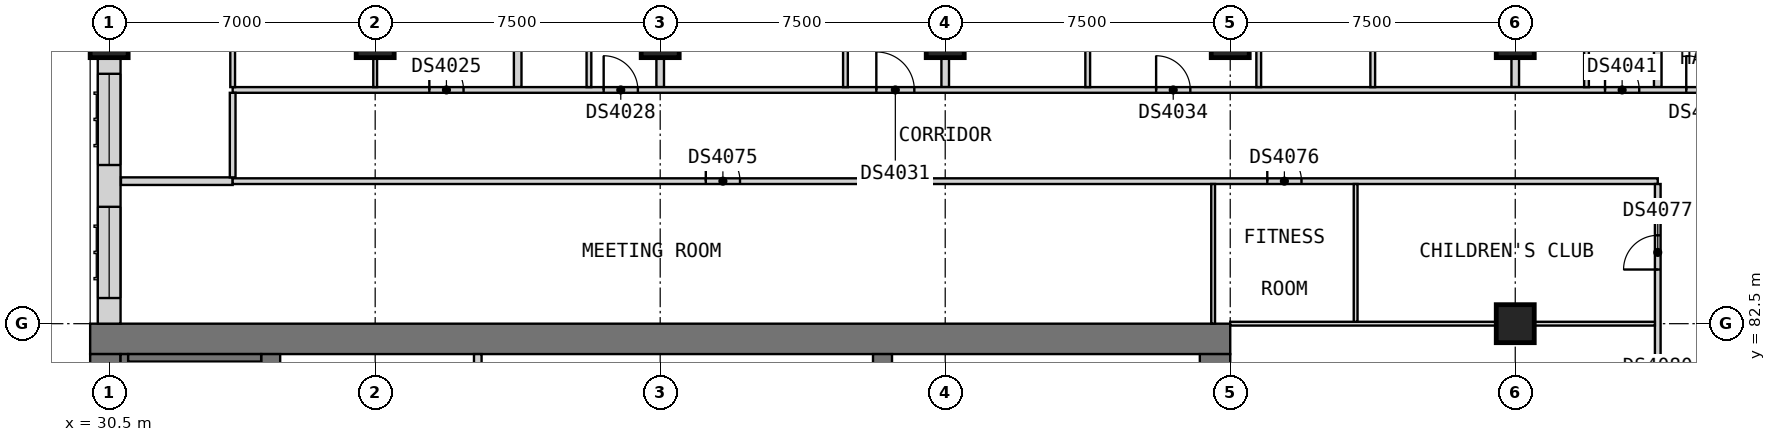
"""IFC4 building model, lengths in metres.
Left out: names, types, materials, properties, quantities, classifications, styles, units other than length and angle.
Written with IfcOpenShell. Run it as: python <this file> out.ifc"""

import sys

from ifc_helpers import new_model, si_unit, direction, frame, frame_2d, origin, origin_2d, place, context, subcontext, project, spatial, rectangle, extrude, element, fill, save


model = new_model("IFC4")
c1 = context("Model", 3, precision=1e-05, world=origin(), true_north=direction((0.0, 1.0)))
c2 = subcontext(c1, "Body", "Model", "MODEL_VIEW")
j1 = project(units=[si_unit("LENGTHUNIT", "METRE"), si_unit("PLANEANGLEUNIT", "RADIAN")], contexts=[c1])
p1 = place(None, origin())
s1 = spatial("IfcSite", under=j1, at=p1, CompositionType="ELEMENT")
p2 = place(p1, origin())
s2 = spatial("IfcBuilding", under=s1, at=p2, CompositionType="ELEMENT")
p3 = place(p2, frame((0.0, 0.0, 141.0)))
s3 = spatial("IfcBuildingStorey", under=s2, at=p3, CompositionType="ELEMENT", Elevation=141.0)
for number, where, z_axis, x_axis in (
    (1, (30.5, 90.0, 0.0), (0.0, 0.0, 1.0), (1.0, 0.0, 0.0)),
    (2, (37.5, 90.0, 0.0), (0.0, 0.0, 1.0), (1.0, 0.0, 0.0)),
    (3, (45.0, 90.0, 0.0), (0.0, 0.0, 1.0), (1.0, 0.0, 0.0)),
    (4, (52.5, 90.0, 0.0), (0.0, 0.0, 1.0), (1.0, 0.0, 0.0)),
    (5, (60.0, 90.0, 0.0), (0.0, 0.0, 1.0), (1.0, 0.0, 0.0)),
    (6, (67.5, 82.5, 0.0), (0.0, 0.0, 1.0), (1.0, 0.0, 0.0)),
    (7, (67.5, 90.0, 0.0), (0.0, 0.0, 1.0), (1.0, 0.0, 0.0)),
):
    element("IfcColumn", number, at=place(p3, frame(where, z_axis=z_axis, x_axis=x_axis)), inside=s3, PredefinedType="COLUMN", context=c2, shape_type="SweptSolid", body=[
        extrude(rectangle(XDim=1.0, YDim=1.0, at=origin_2d()), origin(), (0.0, 0.0, 1.0), 3.6),
    ])
p4 = place(p3, frame((30.0, 82.1, 0.0), z_axis=(0.0, 0.0, 1.0), x_axis=(1.0, 0.0, 0.0)))
e8 = element("IfcWall", 8, at=p4, inside=s3, PredefinedType="SHEAR", context=c2, shape_type="SweptSolid", body=[
    extrude(rectangle(XDim=30.0, YDim=0.8, at=frame_2d((15.0, 0.0))), origin(), (0.0, 0.0, 1.0), 3.6),
])
p5 = place(p3, frame((30.4, 60.8, 0.0), z_axis=(0.0, 0.0, 1.0), x_axis=(0.0, 1.0, 0.0)))
e9 = element("IfcWall", 9, at=p5, inside=s3, PredefinedType="SHEAR", context=c2, shape_type="SweptSolid", body=[
    extrude(rectangle(XDim=20.9, YDim=0.8, at=frame_2d((10.45, 0.0))), origin(), (0.0, 0.0, 1.0), 3.6),
])
p6 = place(p3, frame((59.6, 60.8, 0.0), z_axis=(0.0, 0.0, 1.0), x_axis=(0.0, 1.0, 0.0)))
e10 = element("IfcWall", 10, at=p6, inside=s3, PredefinedType="SHEAR", context=c2, shape_type="SweptSolid", body=[
    extrude(rectangle(XDim=20.9, YDim=0.8, at=frame_2d((10.45, 0.0))), origin(), (0.0, 0.0, 1.0), 3.6),
])
p7 = place(p6, frame((14.7, 0.0, 0.0)))
e11 = element("IfcOpeningElement", 11, at=p7, cuts=e10, PredefinedType="OPENING", context=c2, shape_type="SweptSolid", body=[
    extrude(rectangle(XDim=1.8, YDim=2.1, at=frame_2d((0.9, 1.05))), frame((0.0, 0.41, 0.0), z_axis=(0.0, -1.0, 0.0), x_axis=(1.0, 0.0, 0.0)), (0.0, 0.0, 1.0), 0.82),
])
for number, where, z_axis, x_axis in (
    (12, (34.75, 78.3, 0.0), (0.0, 0.0, 1.0), (0.0, 1.0, 0.0)),
    (13, (50.85, 78.3, 0.0), (0.0, 0.0, 1.0), (0.0, 1.0, 0.0)),
):
    element("IfcWall", number, at=place(p3, frame(where, z_axis=z_axis, x_axis=x_axis)), inside=s3, PredefinedType="SHEAR", context=c2, shape_type="SweptSolid", body=[
        extrude(rectangle(XDim=3.4, YDim=0.5, at=frame_2d((1.7, 0.0))), origin(), (0.0, 0.0, 1.0), 3.6),
    ])
p8 = place(p3, frame((30.5, 89.5, 0.0), z_axis=(0.0, 0.0, 1.0), x_axis=(0.0, -1.0, 0.0)))
e14 = element("IfcWall", 14, at=p8, inside=s3, PredefinedType="SOLIDWALL", context=c2, shape_type="SweptSolid", body=[
    extrude(rectangle(XDim=7.0, YDim=0.6, at=frame_2d((3.5, 0.0))), origin(), (0.0, 0.0, 1.0), 3.35),
])
p9 = place(p8, frame((3.925, 0.0, 0.8)))
e15 = element("IfcOpeningElement", 15, at=p9, cuts=e14, PredefinedType="OPENING", context=c2, shape_type="SweptSolid", body=[
    extrude(rectangle(XDim=2.4, YDim=1.8, at=frame_2d((1.2, 0.9))), frame((0.0, 0.31, 0.0), z_axis=(0.0, -1.0, 0.0), x_axis=(1.0, 0.0, 0.0)), (0.0, 0.0, 1.0), 0.62),
])
p10 = place(p8, frame((0.425, 0.0, 0.8)))
e16 = element("IfcOpeningElement", 16, at=p10, cuts=e14, PredefinedType="OPENING", context=c2, shape_type="SweptSolid", body=[
    extrude(rectangle(XDim=2.4, YDim=1.8, at=frame_2d((1.2, 0.9))), frame((0.0, 0.31, 0.0), z_axis=(0.0, -1.0, 0.0), x_axis=(1.0, 0.0, 0.0)), (0.0, 0.0, 1.0), 0.62),
])
p11 = place(p3, frame((40.2, 78.5, 0.0), z_axis=(0.0, 0.0, 1.0), x_axis=(0.0, 1.0, 0.0)))
e17 = element("IfcWall", 17, at=p11, inside=s3, PredefinedType="SOLIDWALL", context=c2, shape_type="SweptSolid", body=[
    extrude(rectangle(XDim=3.2, YDim=0.2, at=frame_2d((1.6, 0.0))), origin(), (0.0, 0.0, 1.0), 3.6),
])
p12 = place(p3, frame((30.9, 60.8, 0.0), z_axis=(0.0, 0.0, 1.0), x_axis=(0.0, 1.0, 0.0)))
e18 = element("IfcWall", 18, at=p12, inside=s3, PredefinedType="SOLIDWALL", context=c2, shape_type="SweptSolid", body=[
    extrude(rectangle(XDim=20.9, YDim=0.2, at=frame_2d((10.45, 0.0))), origin(), (0.0, 0.0, 1.0), 3.35),
])
p13 = place(p3, frame((31.0, 81.6, 0.0), z_axis=(0.0, 0.0, 1.0), x_axis=(1.0, 0.0, 0.0)))
e19 = element("IfcWall", 19, at=p13, inside=s3, PredefinedType="SOLIDWALL", context=c2, shape_type="SweptSolid", body=[
    extrude(rectangle(XDim=3.5, YDim=0.2, at=frame_2d((1.75, 0.0))), origin(), (0.0, 0.0, 1.0), 3.35),
])
p14 = place(p3, frame((30.81, 86.25, 0.0), z_axis=(0.0, 0.0, 1.0), x_axis=(1.0, 0.0, 0.0)))
e20 = element("IfcWall", 20, at=p14, inside=s3, PredefinedType="PARTITIONING", context=c2, shape_type="SweptSolid", body=[
    extrude(rectangle(XDim=2.94, YDim=0.2, at=frame_2d((1.47, 0.0))), origin(), (0.0, 0.0, 1.0), 3.35),
])
p15 = place(p3, frame((41.25, 88.725, 0.0), z_axis=(0.0, 0.0, 1.0), x_axis=(0.0, 1.0, 0.0)))
e21 = element("IfcWall", 21, at=p15, inside=s3, PredefinedType="PARTITIONING", context=c2, shape_type="SweptSolid", body=[
    extrude(rectangle(XDim=11.715, YDim=0.2, at=frame_2d((5.857, 0.0))), origin(), (0.0, 0.0, 1.0), 3.35),
])
for number, where, z_axis, x_axis in (
    (22, (45.0, 88.725, 0.0), (0.0, 0.0, 1.0), (0.0, 1.0, 0.0)),
    (23, (52.5, 88.725, 0.0), (0.0, 0.0, 1.0), (0.0, 1.0, 0.0)),
    (24, (67.5, 88.725, 0.0), (0.0, 0.0, 1.0), (0.0, 1.0, 0.0)),
):
    element("IfcWall", number, at=place(p3, frame(where, z_axis=z_axis, x_axis=x_axis)), inside=s3, PredefinedType="PARTITIONING", context=c2, shape_type="SweptSolid", body=[
        extrude(rectangle(XDim=12.525, YDim=0.2, at=frame_2d((6.262, 0.0))), origin(), (0.0, 0.0, 1.0), 3.35),
    ])
p16 = place(p3, frame((71.25, 88.725, 0.0), z_axis=(0.0, 0.0, 1.0), x_axis=(0.0, 1.0, 0.0)))
e25 = element("IfcWall", 25, at=p16, inside=s3, PredefinedType="PARTITIONING", context=c2, shape_type="SweptSolid", body=[
    extrude(rectangle(XDim=11.715, YDim=0.2, at=frame_2d((5.857, 0.0))), origin(), (0.0, 0.0, 1.0), 3.35),
])
p17 = place(p3, frame((33.75, 86.25, 0.0), z_axis=(0.0, 0.0, 1.0), x_axis=(1.0, 0.0, 0.0)))
e26 = element("IfcWall", 26, at=p17, inside=s3, PredefinedType="PARTITIONING", context=c2, shape_type="SweptSolid", body=[
    extrude(rectangle(XDim=37.5, YDim=0.15, at=frame_2d((18.75, 0.0))), origin(), (0.0, 0.0, 1.0), 3.35),
])
p18 = place(p17, frame((12.45, 0.0, 0.0)))
e27 = element("IfcOpeningElement", 27, at=p18, cuts=e26, PredefinedType="OPENING", context=c2, shape_type="SweptSolid", body=[
    extrude(rectangle(XDim=0.9, YDim=2.1, at=frame_2d((0.45, 1.05))), frame((0.0, 0.085, 0.0), z_axis=(0.0, -1.0, 0.0), x_axis=(1.0, 0.0, 0.0)), (0.0, 0.0, 1.0), 0.17),
])
p19 = place(p17, frame((27.225, 0.0, 0.0)))
e28 = element("IfcOpeningElement", 28, at=p19, cuts=e26, PredefinedType="OPENING", context=c2, shape_type="SweptSolid", body=[
    extrude(rectangle(XDim=0.9, YDim=2.1, at=frame_2d((0.45, 1.05))), frame((0.0, 0.085, 0.0), z_axis=(0.0, -1.0, 0.0), x_axis=(1.0, 0.0, 0.0)), (0.0, 0.0, 1.0), 0.17),
])
p20 = place(p3, frame((33.75, 88.65, 0.0), z_axis=(0.0, 0.0, 1.0), x_axis=(1.0, 0.0, 0.0)))
e29 = element("IfcWall", 29, at=p20, inside=s3, PredefinedType="PARTITIONING", context=c2, shape_type="SweptSolid", body=[
    extrude(rectangle(XDim=39.9, YDim=0.15, at=frame_2d((19.95, 0.0))), origin(), (0.0, 0.0, 1.0), 3.35),
])
p21 = place(p20, frame((5.175, 0.0, 0.0)))
e30 = element("IfcOpeningElement", 30, at=p21, cuts=e29, PredefinedType="OPENING", context=c2, shape_type="SweptSolid", body=[
    extrude(rectangle(XDim=0.9, YDim=2.1, at=frame_2d((0.45, 1.05))), frame((0.0, 0.085, 0.0), z_axis=(0.0, -1.0, 0.0), x_axis=(1.0, 0.0, 0.0)), (0.0, 0.0, 1.0), 0.17),
])
p22 = place(p20, frame((9.762, 0.0, 0.0)))
e31 = element("IfcOpeningElement", 31, at=p22, cuts=e29, PredefinedType="OPENING", context=c2, shape_type="SweptSolid", body=[
    extrude(rectangle(XDim=0.9, YDim=2.1, at=frame_2d((0.45, 1.05))), frame((0.0, 0.085, 0.0), z_axis=(0.0, -1.0, 0.0), x_axis=(1.0, 0.0, 0.0)), (0.0, 0.0, 1.0), 0.17),
])
p23 = place(p20, frame((16.938, 0.0, 0.0)))
e32 = element("IfcOpeningElement", 32, at=p23, cuts=e29, PredefinedType="OPENING", context=c2, shape_type="SweptSolid", body=[
    extrude(rectangle(XDim=1.0, YDim=2.1, at=frame_2d((0.5, 1.05))), frame((0.0, 0.085, 0.0), z_axis=(0.0, -1.0, 0.0), x_axis=(1.0, 0.0, 0.0)), (0.0, 0.0, 1.0), 0.17),
])
p24 = place(p20, frame((24.3, 0.0, 0.0)))
e33 = element("IfcOpeningElement", 33, at=p24, cuts=e29, PredefinedType="OPENING", context=c2, shape_type="SweptSolid", body=[
    extrude(rectangle(XDim=0.9, YDim=2.1, at=frame_2d((0.45, 1.05))), frame((0.0, 0.085, 0.0), z_axis=(0.0, -1.0, 0.0), x_axis=(1.0, 0.0, 0.0)), (0.0, 0.0, 1.0), 0.17),
])
p25 = place(p20, frame((36.113, 0.0, 0.0)))
e34 = element("IfcOpeningElement", 34, at=p25, cuts=e29, PredefinedType="OPENING", context=c2, shape_type="SweptSolid", body=[
    extrude(rectangle(XDim=0.9, YDim=2.1, at=frame_2d((0.45, 1.05))), frame((0.0, 0.085, 0.0), z_axis=(0.0, -1.0, 0.0), x_axis=(1.0, 0.0, 0.0)), (0.0, 0.0, 1.0), 0.17),
])
p26 = place(p20, frame((38.25, 0.0, 0.0)))
e35 = element("IfcOpeningElement", 35, at=p26, cuts=e29, PredefinedType="OPENING", context=c2, shape_type="SweptSolid", body=[
    extrude(rectangle(XDim=0.9, YDim=2.1, at=frame_2d((0.45, 1.05))), frame((0.0, 0.085, 0.0), z_axis=(0.0, -1.0, 0.0), x_axis=(1.0, 0.0, 0.0)), (0.0, 0.0, 1.0), 0.17),
])
p27 = place(p3, frame((33.75, 86.35, 0.0), z_axis=(0.0, 0.0, 1.0), x_axis=(0.0, 1.0, 0.0)))
e36 = element("IfcWall", 36, at=p27, inside=s3, PredefinedType="PARTITIONING", context=c2, shape_type="SweptSolid", body=[
    extrude(rectangle(XDim=2.225, YDim=0.15, at=frame_2d((1.112, 0.0))), origin(), (0.0, 0.0, 1.0), 3.35),
])
p28 = place(p3, frame((71.25, 78.075, 0.0), z_axis=(0.0, 0.0, 1.0), x_axis=(0.0, 1.0, 0.0)))
e37 = element("IfcWall", 37, at=p28, inside=s3, PredefinedType="PARTITIONING", context=c2, shape_type="SweptSolid", body=[
    extrude(rectangle(XDim=8.1, YDim=0.15, at=frame_2d((4.05, 0.0))), origin(), (0.0, 0.0, 1.0), 3.35),
])
p29 = place(p28, frame((5.85, 0.0, 0.0)))
e38 = element("IfcOpeningElement", 38, at=p29, cuts=e37, PredefinedType="OPENING", context=c2, shape_type="SweptSolid", body=[
    extrude(rectangle(XDim=0.9, YDim=2.1, at=frame_2d((0.45, 1.05))), frame((0.0, 0.085, 0.0), z_axis=(0.0, -1.0, 0.0), x_axis=(1.0, 0.0, 0.0)), (0.0, 0.0, 1.0), 0.17),
])
p30 = place(p28, frame((1.725, 0.0, 0.0)))
e39 = element("IfcOpeningElement", 39, at=p30, cuts=e37, PredefinedType="OPENING", context=c2, shape_type="SweptSolid", body=[
    extrude(rectangle(XDim=0.9, YDim=2.1, at=frame_2d((0.45, 1.05))), frame((0.0, 0.085, 0.0), z_axis=(0.0, -1.0, 0.0), x_axis=(1.0, 0.0, 0.0)), (0.0, 0.0, 1.0), 0.17),
])
p31 = place(p3, frame((60.0, 82.5, 0.0), z_axis=(0.0, 0.0, 1.0), x_axis=(1.0, 0.0, 0.0)))
e40 = element("IfcWall", 40, at=p31, inside=s3, PredefinedType="PARTITIONING", context=c2, shape_type="SweptSolid", body=[
    extrude(rectangle(XDim=11.175, YDim=0.1, at=frame_2d((5.587, 0.0))), origin(), (0.0, 0.0, 1.0), 3.35),
])
p32 = place(p3, frame((37.5, 88.725, 0.0), z_axis=(0.0, 0.0, 1.0), x_axis=(0.0, 1.0, 0.0)))
e41 = element("IfcWall", 41, at=p32, inside=s3, PredefinedType="PARTITIONING", context=c2, shape_type="SweptSolid", body=[
    extrude(rectangle(XDim=4.475, YDim=0.1, at=frame_2d((2.237, 0.0))), origin(), (0.0, 0.0, 1.0), 3.35),
])
p33 = place(p32, frame((1.825, 0.0, 0.0)))
e42 = element("IfcOpeningElement", 42, at=p33, cuts=e41, PredefinedType="OPENING", context=c2, shape_type="SweptSolid", body=[
    extrude(rectangle(XDim=0.9, YDim=2.1, at=frame_2d((0.45, 1.05))), frame((0.0, 0.06, 0.0), z_axis=(0.0, -1.0, 0.0), x_axis=(1.0, 0.0, 0.0)), (0.0, 0.0, 1.0), 0.12),
])
p34 = place(p3, frame((59.55, 82.5, 0.0), z_axis=(0.0, 0.0, 1.0), x_axis=(0.0, 1.0, 0.0)))
e43 = element("IfcWall", 43, at=p34, inside=s3, PredefinedType="PARTITIONING", context=c2, shape_type="SweptSolid", body=[
    extrude(rectangle(XDim=3.675, YDim=0.1, at=frame_2d((1.837, 0.0))), origin(), (0.0, 0.0, 1.0), 3.35),
])
p35 = place(p3, frame((63.3, 82.55, 0.0), z_axis=(0.0, 0.0, 1.0), x_axis=(0.0, 1.0, 0.0)))
e44 = element("IfcWall", 44, at=p35, inside=s3, PredefinedType="PARTITIONING", context=c2, shape_type="SweptSolid", body=[
    extrude(rectangle(XDim=3.625, YDim=0.1, at=frame_2d((1.812, 0.0))), origin(), (0.0, 0.0, 1.0), 3.35),
])
for number, where, z_axis, x_axis in (
    (45, (33.75, 88.725, 0.0), (0.0, 0.0, 1.0), (0.0, 1.0, 0.0)),
    (46, (43.125, 88.725, 0.0), (0.0, 0.0, 1.0), (0.0, 1.0, 0.0)),
    (47, (49.875, 88.725, 0.0), (0.0, 0.0, 1.0), (0.0, 1.0, 0.0)),
    (48, (56.25, 88.725, 0.0), (0.0, 0.0, 1.0), (0.0, 1.0, 0.0)),
):
    element("IfcWall", number, at=place(p3, frame(where, z_axis=z_axis, x_axis=x_axis)), inside=s3, PredefinedType="PARTITIONING", context=c2, shape_type="SweptSolid", body=[
        extrude(rectangle(XDim=4.462, YDim=0.125, at=frame_2d((2.231, 0.0))), origin(), (0.0, 0.0, 1.0), 3.35),
    ])
p36 = place(p3, frame((60.75, 88.725, 0.0), z_axis=(0.0, 0.0, 1.0), x_axis=(0.0, 1.0, 0.0)))
e49 = element("IfcWall", 49, at=p36, inside=s3, PredefinedType="PARTITIONING", context=c2, shape_type="SweptSolid", body=[
    extrude(rectangle(XDim=4.462, YDim=0.125, at=frame_2d((2.231, 0.0))), origin(), (0.0, 0.0, 1.0), 3.35),
])
p37 = place(p36, frame((1.825, 0.0, 0.0)))
e50 = element("IfcOpeningElement", 50, at=p37, cuts=e49, PredefinedType="OPENING", context=c2, shape_type="SweptSolid", body=[
    extrude(rectangle(XDim=0.9, YDim=2.1, at=frame_2d((0.45, 1.05))), frame((0.0, 0.073, 0.0), z_axis=(0.0, -1.0, 0.0), x_axis=(1.0, 0.0, 0.0)), (0.0, 0.0, 1.0), 0.145),
])
for number, where, z_axis, x_axis in (
    (51, (63.75, 88.725, 0.0), (0.0, 0.0, 1.0), (0.0, 1.0, 0.0)),
    (52, (69.375, 88.725, 0.0), (0.0, 0.0, 1.0), (0.0, 1.0, 0.0)),
):
    element("IfcWall", number, at=place(p3, frame(where, z_axis=z_axis, x_axis=x_axis)), inside=s3, PredefinedType="PARTITIONING", context=c2, shape_type="SweptSolid", body=[
        extrude(rectangle(XDim=4.462, YDim=0.125, at=frame_2d((2.231, 0.0))), origin(), (0.0, 0.0, 1.0), 3.35),
    ])
p38 = place(p9, origin())
e53 = element("IfcWindow", 53, at=p38, inside=s3, PartitioningType="SINGLE_PANEL", PredefinedType="WINDOW", context=c2, shape_type="SweptSolid", body=[
    extrude(rectangle(XDim=2.4, YDim=1.8, at=frame_2d((1.2, 0.9))), frame((0.0, -0.07, 0.0), z_axis=(0.0, -1.0, 0.0), x_axis=(1.0, 0.0, 0.0)), (0.0, 0.0, 1.0), 0.06),
])
fill(e15, e53)
p39 = place(p10, origin())
e54 = element("IfcWindow", 54, at=p39, inside=s3, PartitioningType="SINGLE_PANEL", PredefinedType="WINDOW", context=c2, shape_type="SweptSolid", body=[
    extrude(rectangle(XDim=2.4, YDim=1.8, at=frame_2d((1.2, 0.9))), frame((0.0, -0.07, 0.0), z_axis=(0.0, -1.0, 0.0), x_axis=(1.0, 0.0, 0.0)), (0.0, 0.0, 1.0), 0.06),
])
fill(e16, e54)
p40 = place(p21, origin())
e55 = element("IfcDoor", 55, at=p40, inside=s3, OperationType="SINGLE_SWING_LEFT", PredefinedType="DOOR", context=c2, shape_type="SweptSolid", body=[
    extrude(rectangle(XDim=0.9, YDim=2.1, at=frame_2d((0.45, 1.05))), frame((0.0, 0.025, 0.0), z_axis=(0.0, -1.0, 0.0), x_axis=(1.0, 0.0, 0.0)), (0.0, 0.0, 1.0), 0.05),
])
fill(e30, e55)
p41 = place(p22, origin())
e56 = element("IfcDoor", 56, at=p41, inside=s3, OperationType="SINGLE_SWING_LEFT", PredefinedType="DOOR", context=c2, shape_type="SweptSolid", body=[
    extrude(rectangle(XDim=0.9, YDim=2.1, at=frame_2d((0.45, 1.05))), frame((0.0, 0.025, 0.0), z_axis=(0.0, -1.0, 0.0), x_axis=(1.0, 0.0, 0.0)), (0.0, 0.0, 1.0), 0.05),
])
fill(e31, e56)
p42 = place(p23, origin())
e57 = element("IfcDoor", 57, at=p42, inside=s3, OperationType="SINGLE_SWING_LEFT", PredefinedType="DOOR", context=c2, shape_type="SweptSolid", body=[
    extrude(rectangle(XDim=1.0, YDim=2.1, at=frame_2d((0.5, 1.05))), frame((0.0, 0.025, 0.0), z_axis=(0.0, -1.0, 0.0), x_axis=(1.0, 0.0, 0.0)), (0.0, 0.0, 1.0), 0.05),
])
fill(e32, e57)
p43 = place(p24, origin())
e58 = element("IfcDoor", 58, at=p43, inside=s3, OperationType="SINGLE_SWING_LEFT", PredefinedType="DOOR", context=c2, shape_type="SweptSolid", body=[
    extrude(rectangle(XDim=0.9, YDim=2.1, at=frame_2d((0.45, 1.05))), frame((0.0, 0.025, 0.0), z_axis=(0.0, -1.0, 0.0), x_axis=(1.0, 0.0, 0.0)), (0.0, 0.0, 1.0), 0.05),
])
fill(e33, e58)
p44 = place(p25, origin())
e59 = element("IfcDoor", 59, at=p44, inside=s3, OperationType="SINGLE_SWING_LEFT", PredefinedType="DOOR", context=c2, shape_type="SweptSolid", body=[
    extrude(rectangle(XDim=0.9, YDim=2.1, at=frame_2d((0.45, 1.05))), frame((0.0, 0.025, 0.0), z_axis=(0.0, -1.0, 0.0), x_axis=(1.0, 0.0, 0.0)), (0.0, 0.0, 1.0), 0.05),
])
fill(e34, e59)
p45 = place(p26, origin())
e60 = element("IfcDoor", 60, at=p45, inside=s3, OperationType="SINGLE_SWING_RIGHT", PredefinedType="DOOR", context=c2, shape_type="SweptSolid", body=[
    extrude(rectangle(XDim=0.9, YDim=2.1, at=frame_2d((0.45, 1.05))), frame((0.0, 0.025, 0.0), z_axis=(0.0, -1.0, 0.0), x_axis=(1.0, 0.0, 0.0)), (0.0, 0.0, 1.0), 0.05),
])
fill(e35, e60)
p46 = place(p18, origin())
e61 = element("IfcDoor", 61, at=p46, inside=s3, OperationType="SINGLE_SWING_RIGHT", PredefinedType="DOOR", context=c2, shape_type="SweptSolid", body=[
    extrude(rectangle(XDim=0.9, YDim=2.1, at=frame_2d((0.45, 1.05))), frame((0.0, 0.025, 0.0), z_axis=(0.0, -1.0, 0.0), x_axis=(1.0, 0.0, 0.0)), (0.0, 0.0, 1.0), 0.05),
])
fill(e27, e61)
p47 = place(p19, origin())
e62 = element("IfcDoor", 62, at=p47, inside=s3, OperationType="SINGLE_SWING_RIGHT", PredefinedType="DOOR", context=c2, shape_type="SweptSolid", body=[
    extrude(rectangle(XDim=0.9, YDim=2.1, at=frame_2d((0.45, 1.05))), frame((0.0, 0.025, 0.0), z_axis=(0.0, -1.0, 0.0), x_axis=(1.0, 0.0, 0.0)), (0.0, 0.0, 1.0), 0.05),
])
fill(e28, e62)
p48 = place(p29, origin())
e63 = element("IfcDoor", 63, at=p48, inside=s3, OperationType="SINGLE_SWING_LEFT", PredefinedType="DOOR", context=c2, shape_type="SweptSolid", body=[
    extrude(rectangle(XDim=0.9, YDim=2.1, at=frame_2d((0.45, 1.05))), frame((0.0, 0.025, 0.0), z_axis=(0.0, -1.0, 0.0), x_axis=(1.0, 0.0, 0.0)), (0.0, 0.0, 1.0), 0.05),
])
fill(e38, e63)
save(model, sys.argv[1])
